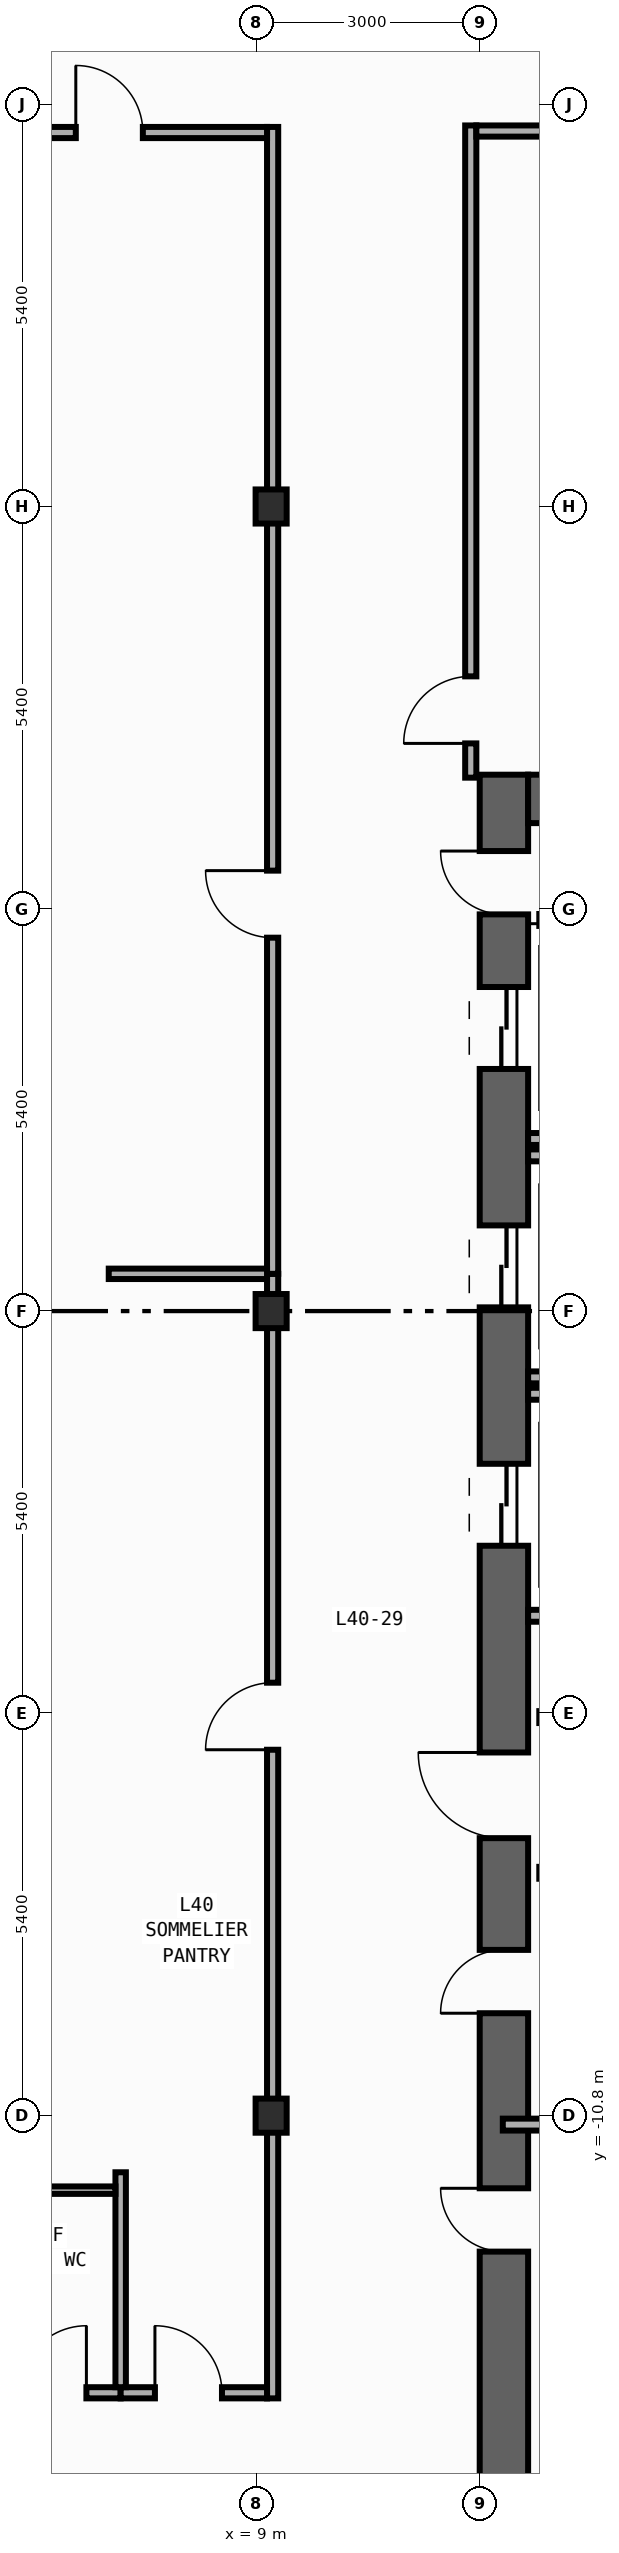
"""IFC4 building model, lengths in metres.
Left out: names, types, materials, properties, quantities, classifications, styles, units other than length and angle.
Written with IfcOpenShell. Run it as: python <this file> out.ifc"""

import sys

from ifc_helpers import new_model, si_unit, direction, frame, frame_2d, origin, origin_2d, place, context, subcontext, project, spatial, rectangle, i_section, extrude, element, fill, save


model = new_model("IFC4")
c1 = context("Model", 3, precision=1e-05, world=origin(), true_north=direction((0.0, 1.0)))
c2 = subcontext(c1, "Body", "Model", "MODEL_VIEW")
j1 = project(units=[si_unit("LENGTHUNIT", "METRE"), si_unit("PLANEANGLEUNIT", "RADIAN")], contexts=[c1])
p1 = place(None, origin())
s1 = spatial("IfcSite", under=j1, at=p1, CompositionType="ELEMENT")
p2 = place(p1, origin())
s2 = spatial("IfcBuilding", under=s1, at=p2, CompositionType="ELEMENT")
p3 = place(p2, frame((0.0, 0.0, 176.4)))
s3 = spatial("IfcBuildingStorey", under=s2, at=p3, CompositionType="ELEMENT", Elevation=176.4)
p4 = place(p3, frame((12.325, -19.8, 0.0), z_axis=(0.0, 0.0, 1.0), x_axis=(0.0, 1.0, 0.0)))
e1 = element("IfcWall", 1, at=p4, inside=s3, PredefinedType="SHEAR", context=c2, shape_type="SweptSolid", body=[
    extrude(rectangle(XDim=27.0, YDim=0.65, at=frame_2d((13.5, 0.0))), origin(), (0.0, 0.0, 1.0), 3.54),
])
p5 = place(p4, frame((23.05, 0.0, 0.0)))
e2 = element("IfcOpeningElement", 2, at=p5, cuts=e1, PredefinedType="OPENING", context=c2, shape_type="SweptSolid", body=[
    extrude(rectangle(XDim=1.1, YDim=2.2, at=frame_2d((0.55, 1.1))), frame((0.0, 0.335, 0.0), z_axis=(0.0, -1.0, 0.0), x_axis=(1.0, 0.0, 0.0)), (0.0, 0.0, 1.0), 0.67),
])
p6 = place(p4, frame((19.85, 0.0, 0.0)))
e3 = element("IfcOpeningElement", 3, at=p6, cuts=e1, PredefinedType="OPENING", context=c2, shape_type="SweptSolid", body=[
    extrude(rectangle(XDim=1.1, YDim=2.2, at=frame_2d((0.55, 1.1))), frame((0.0, 0.335, 0.0), z_axis=(0.0, -1.0, 0.0), x_axis=(1.0, 0.0, 0.0)), (0.0, 0.0, 1.0), 0.67),
])
p7 = place(p4, frame((16.65, 0.0, 0.0)))
e4 = element("IfcOpeningElement", 4, at=p7, cuts=e1, PredefinedType="OPENING", context=c2, shape_type="SweptSolid", body=[
    extrude(rectangle(XDim=1.1, YDim=2.2, at=frame_2d((0.55, 1.1))), frame((0.0, 0.335, 0.0), z_axis=(0.0, -1.0, 0.0), x_axis=(1.0, 0.0, 0.0)), (0.0, 0.0, 1.0), 0.67),
])
p8 = place(p4, frame((7.175, 0.0, 0.0)))
e5 = element("IfcOpeningElement", 5, at=p8, cuts=e1, PredefinedType="OPENING", context=c2, shape_type="SweptSolid", body=[
    extrude(rectangle(XDim=0.85, YDim=2.1, at=frame_2d((0.425, 1.05))), frame((0.0, 0.335, 0.0), z_axis=(0.0, -1.0, 0.0), x_axis=(1.0, 0.0, 0.0)), (0.0, 0.0, 1.0), 0.67),
])
p9 = place(p4, frame((10.375, 0.0, 0.0)))
e6 = element("IfcOpeningElement", 6, at=p9, cuts=e1, PredefinedType="OPENING", context=c2, shape_type="SweptSolid", body=[
    extrude(rectangle(XDim=0.85, YDim=2.1, at=frame_2d((0.425, 1.05))), frame((0.0, 0.335, 0.0), z_axis=(0.0, -1.0, 0.0), x_axis=(1.0, 0.0, 0.0)), (0.0, 0.0, 1.0), 0.67),
])
p10 = place(p4, frame((12.725, 0.0, 0.0)))
e7 = element("IfcOpeningElement", 7, at=p10, cuts=e1, PredefinedType="OPENING", context=c2, shape_type="SweptSolid", body=[
    extrude(rectangle(XDim=1.15, YDim=2.2, at=frame_2d((0.575, 1.1))), frame((0.0, 0.335, 0.0), z_axis=(0.0, -1.0, 0.0), x_axis=(1.0, 0.0, 0.0)), (0.0, 0.0, 1.0), 0.67),
])
p11 = place(p4, frame((25.125, 0.0, 0.0)))
e8 = element("IfcOpeningElement", 8, at=p11, cuts=e1, PredefinedType="OPENING", context=c2, shape_type="SweptSolid", body=[
    extrude(rectangle(XDim=0.85, YDim=2.1, at=frame_2d((0.425, 1.05))), frame((0.0, 0.335, 0.0), z_axis=(0.0, -1.0, 0.0), x_axis=(1.0, 0.0, 0.0)), (0.0, 0.0, 1.0), 0.67),
])
p12 = place(p3, frame((12.65, 6.875, 0.0), z_axis=(0.0, 0.0, 1.0), x_axis=(1.0, 0.0, 0.0)))
e9 = element("IfcWall", 9, at=p12, inside=s3, PredefinedType="SHEAR", context=c2, shape_type="SweptSolid", body=[
    extrude(rectangle(XDim=7.1, YDim=0.65, at=frame_2d((3.55, 0.0))), origin(), (0.0, 0.0, 1.0), 3.54),
])
for number, where, z_axis, x_axis in (
    (10, (9.2, -10.8, 0.0), (0.0, 0.0, 1.0), (1.0, 0.0, 0.0)),
    (11, (9.2, 0.0, 0.0), (0.0, 0.0, 1.0), (1.0, 0.0, 0.0)),
    (12, (9.2, 10.8, 0.0), (0.0, 0.0, 1.0), (1.0, 0.0, 0.0)),
):
    element("IfcColumn", number, at=place(p3, frame(where, z_axis=z_axis, x_axis=x_axis)), inside=s3, PredefinedType="COLUMN", context=c2, shape_type="SweptSolid", body=[
        extrude(i_section(OverallWidth=0.417, OverallDepth=0.458, WebThickness=0.03, FlangeThickness=0.05, FilletRadius=0.022, at=origin_2d()), origin(), (0.0, 0.0, 1.0), 3.8),
    ])
for number, where, z_axis, x_axis in (
    (13, (12.65, 2.31, 0.0), (0.0, 0.0, 1.0), (1.0, 0.0, 0.0)),
    (14, (12.65, -0.89, 0.0), (0.0, 0.0, 1.0), (1.0, 0.0, 0.0)),
    (15, (12.65, 2.09, 0.0), (0.0, 0.0, 1.0), (1.0, 0.0, 0.0)),
    (16, (12.65, -4.09, 0.0), (0.0, 0.0, 1.0), (1.0, 0.0, 0.0)),
    (17, (12.65, -1.11, 0.0), (0.0, 0.0, 1.0), (1.0, 0.0, 0.0)),
):
    element("IfcWall", number, at=place(p3, frame(where, z_axis=z_axis, x_axis=x_axis)), inside=s3, PredefinedType="STANDARD", context=c2, shape_type="SweptSolid", body=[
        extrude(rectangle(XDim=2.34, YDim=0.16, at=frame_2d((1.17, 0.0))), origin(), (0.0, 0.0, 1.0), 3.54),
    ])
for number, where, z_axis, x_axis in (
    (18, (12.8, -5.45, 0.0), (0.0, 0.0, 1.0), (1.0, 0.0, 0.0)),
    (19, (12.8, -7.54, 0.0), (0.0, 0.0, 1.0), (1.0, 0.0, 0.0)),
    (20, (12.8, 5.25, 0.0), (0.0, 0.0, 1.0), (1.0, 0.0, 0.0)),
):
    element("IfcWall", number, at=place(p3, frame(where, z_axis=z_axis, x_axis=x_axis)), inside=s3, PredefinedType="STANDARD", context=c2, shape_type="SweptSolid", body=[
        extrude(rectangle(XDim=2.6, YDim=0.16, at=frame_2d((1.3, 0.0))), origin(), (0.0, 0.0, 1.0), 3.54),
    ])
p13 = place(p3, frame((12.31, -10.92, 0.0), z_axis=(0.0, 0.0, 1.0), x_axis=(1.0, 0.0, 0.0)))
e21 = element("IfcWall", 21, at=p13, inside=s3, PredefinedType="PARTITIONING", context=c2, shape_type="SweptSolid", body=[
    extrude(rectangle(XDim=3.065, YDim=0.16, at=frame_2d((1.532, 0.0))), origin(), (0.0, 0.0, 1.0), 2.952),
])
p14 = place(p3, frame((9.22, -14.595, 0.0), z_axis=(0.0, 0.0, 1.0), x_axis=(0.0, 1.0, 0.0)))
e22 = element("IfcWall", 22, at=p14, inside=s3, PredefinedType="PARTITIONING", context=c2, shape_type="SweptSolid", body=[
    extrude(rectangle(XDim=15.095, YDim=0.15, at=frame_2d((7.547, 0.0))), origin(), (0.0, 0.0, 1.0), 2.952),
])
p15 = place(p14, frame((8.707, 0.0, 0.0)))
e23 = element("IfcOpeningElement", 23, at=p15, cuts=e22, PredefinedType="OPENING", context=c2, shape_type="SweptSolid", body=[
    extrude(rectangle(XDim=0.9, YDim=2.15, at=frame_2d((0.45, 1.075))), frame((0.0, 0.085, 0.0), z_axis=(0.0, -1.0, 0.0), x_axis=(1.0, 0.0, 0.0)), (0.0, 0.0, 1.0), 0.17),
])
p16 = place(p3, frame((9.22, 0.5, 0.0), z_axis=(0.0, 0.0, 1.0), x_axis=(0.0, 1.0, 0.0)))
e24 = element("IfcWall", 24, at=p16, inside=s3, PredefinedType="PARTITIONING", context=c2, shape_type="SweptSolid", body=[
    extrude(rectangle(XDim=15.395, YDim=0.15, at=frame_2d((7.698, 0.0))), origin(), (0.0, 0.0, 1.0), 2.952),
])
p17 = place(p16, frame((4.512, 0.0, 0.0)))
e25 = element("IfcOpeningElement", 25, at=p17, cuts=e24, PredefinedType="OPENING", context=c2, shape_type="SweptSolid", body=[
    extrude(rectangle(XDim=0.9, YDim=2.15, at=frame_2d((0.45, 1.075))), frame((0.0, 0.085, 0.0), z_axis=(0.0, -1.0, 0.0), x_axis=(1.0, 0.0, 0.0)), (0.0, 0.0, 1.0), 0.17),
])
p18 = place(p3, frame((11.88, 7.16, 0.0), z_axis=(0.0, 0.0, 1.0), x_axis=(0.0, 1.0, 0.0)))
e26 = element("IfcWall", 26, at=p18, inside=s3, PredefinedType="PARTITIONING", context=c2, shape_type="SweptSolid", body=[
    extrude(rectangle(XDim=8.755, YDim=0.15, at=frame_2d((4.377, 0.0))), origin(), (0.0, 0.0, 1.0), 3.54),
])
p19 = place(p18, frame((0.46, 0.0, 0.0)))
e27 = element("IfcOpeningElement", 27, at=p19, cuts=e26, PredefinedType="OPENING", context=c2, shape_type="SweptSolid", body=[
    extrude(rectangle(XDim=0.9, YDim=2.15, at=frame_2d((0.45, 1.075))), frame((0.0, 0.085, 0.0), z_axis=(0.0, -1.0, 0.0), x_axis=(1.0, 0.0, 0.0)), (0.0, 0.0, 1.0), 0.17),
])
p20 = place(p3, frame((-0.32, 15.82, 0.0), z_axis=(0.0, 0.0, 1.0), x_axis=(1.0, 0.0, 0.0)))
e28 = element("IfcWall", 28, at=p20, inside=s3, PredefinedType="PARTITIONING", context=c2, shape_type="SweptSolid", body=[
    extrude(rectangle(XDim=9.465, YDim=0.15, at=frame_2d((4.732, 0.0))), origin(), (0.0, 0.0, 1.0), 3.54),
])
p21 = place(p20, frame((6.898, 0.0, 0.0)))
e29 = element("IfcOpeningElement", 29, at=p21, cuts=e28, PredefinedType="OPENING", context=c2, shape_type="SweptSolid", body=[
    extrude(rectangle(XDim=0.9, YDim=2.15, at=frame_2d((0.45, 1.075))), frame((0.0, 0.085, 0.0), z_axis=(0.0, -1.0, 0.0), x_axis=(1.0, 0.0, 0.0)), (0.0, 0.0, 1.0), 0.17),
])
p22 = place(p3, frame((11.955, 15.84, 0.0), z_axis=(0.0, 0.0, 1.0), x_axis=(1.0, 0.0, 0.0)))
e30 = element("IfcWall", 30, at=p22, inside=s3, PredefinedType="PARTITIONING", context=c2, shape_type="SweptSolid", body=[
    extrude(rectangle(XDim=10.5, YDim=0.15, at=frame_2d((5.25, 0.0))), origin(), (0.0, 0.0, 1.0), 3.54),
])
p23 = place(p22, frame((4.901, 0.0, 0.0)))
e31 = element("IfcOpeningElement", 31, at=p23, cuts=e30, PredefinedType="OPENING", context=c2, shape_type="SweptSolid", body=[
    extrude(rectangle(XDim=0.9, YDim=2.15, at=frame_2d((0.45, 1.075))), frame((0.0, 0.085, 0.0), z_axis=(0.0, -1.0, 0.0), x_axis=(1.0, 0.0, 0.0)), (0.0, 0.0, 1.0), 0.17),
])
p24 = place(p3, frame((4.28, -14.52, 0.0), z_axis=(0.0, 0.0, 1.0), x_axis=(1.0, 0.0, 0.0)))
e32 = element("IfcWall", 32, at=p24, inside=s3, PredefinedType="PARTITIONING", context=c2, shape_type="SweptSolid", body=[
    extrude(rectangle(XDim=2.9, YDim=0.15, at=frame_2d((1.45, 0.0))), origin(), (0.0, 0.0, 1.0), 3.54),
])
p25 = place(p24, frame((1.54, 0.0, 0.0)))
e33 = element("IfcOpeningElement", 33, at=p25, cuts=e32, PredefinedType="OPENING", context=c2, shape_type="SweptSolid", body=[
    extrude(rectangle(XDim=0.9, YDim=2.15, at=frame_2d((0.45, 1.075))), frame((0.0, 0.085, 0.0), z_axis=(0.0, -1.0, 0.0), x_axis=(1.0, 0.0, 0.0)), (0.0, 0.0, 1.0), 0.17),
])
p26 = place(p3, frame((7.18, -14.52, 0.0), z_axis=(0.0, 0.0, 1.0), x_axis=(1.0, 0.0, 0.0)))
e34 = element("IfcWall", 34, at=p26, inside=s3, PredefinedType="PARTITIONING", context=c2, shape_type="SweptSolid", body=[
    extrude(rectangle(XDim=1.965, YDim=0.15, at=frame_2d((0.982, 0.0))), origin(), (0.0, 0.0, 1.0), 3.54),
])
p27 = place(p26, frame((0.46, 0.0, 0.0)))
e35 = element("IfcOpeningElement", 35, at=p27, cuts=e34, PredefinedType="OPENING", context=c2, shape_type="SweptSolid", body=[
    extrude(rectangle(XDim=0.9, YDim=2.15, at=frame_2d((0.45, 1.075))), frame((0.0, 0.085, 0.0), z_axis=(0.0, -1.0, 0.0), x_axis=(1.0, 0.0, 0.0)), (0.0, 0.0, 1.0), 0.17),
])
p28 = place(p3, frame((7.18, -14.445, 0.0), z_axis=(0.0, 0.0, 1.0), x_axis=(0.0, 1.0, 0.0)))
e36 = element("IfcWall", 36, at=p28, inside=s3, PredefinedType="PARTITIONING", context=c2, shape_type="SweptSolid", body=[
    extrude(rectangle(XDim=2.885, YDim=0.14, at=frame_2d((1.442, 0.0))), origin(), (0.0, 0.0, 1.0), 3.54),
])
p29 = place(p3, frame((7.02, 0.5, 0.0), z_axis=(0.0, 0.0, 1.0), x_axis=(1.0, 0.0, 0.0)))
e37 = element("IfcWall", 37, at=p29, inside=s3, PredefinedType="PARTITIONING", context=c2, shape_type="SweptSolid", body=[
    extrude(rectangle(XDim=2.125, YDim=0.14, at=frame_2d((1.062, 0.0))), origin(), (0.0, 0.0, 1.0), 3.54),
])
p30 = place(p3, frame((4.35, -11.8, 0.0), z_axis=(0.0, 0.0, 1.0), x_axis=(1.0, 0.0, 0.0)))
e38 = element("IfcWall", 38, at=p30, inside=s3, PredefinedType="PARTITIONING", context=c2, shape_type="SweptSolid", body=[
    extrude(rectangle(XDim=2.76, YDim=0.1, at=frame_2d((1.38, 0.0))), origin(), (0.0, 0.0, 1.0), 3.54),
])
p31 = place(p5, origin())
e39 = element("IfcDoor", 39, at=p31, inside=s3, OperationType="DOUBLE_DOOR_SLIDING", PredefinedType="DOOR", context=c2, shape_type="SweptSolid", body=[
    extrude(rectangle(XDim=1.1, YDim=2.2, at=frame_2d((0.55, 1.1))), frame((0.0, 0.025, 0.0), z_axis=(0.0, -1.0, 0.0), x_axis=(1.0, 0.0, 0.0)), (0.0, 0.0, 1.0), 0.05),
])
fill(e2, e39)
p32 = place(p6, origin())
e40 = element("IfcDoor", 40, at=p32, inside=s3, OperationType="DOUBLE_DOOR_SLIDING", PredefinedType="DOOR", context=c2, shape_type="SweptSolid", body=[
    extrude(rectangle(XDim=1.1, YDim=2.2, at=frame_2d((0.55, 1.1))), frame((0.0, 0.025, 0.0), z_axis=(0.0, -1.0, 0.0), x_axis=(1.0, 0.0, 0.0)), (0.0, 0.0, 1.0), 0.05),
])
fill(e3, e40)
p33 = place(p7, origin())
e41 = element("IfcDoor", 41, at=p33, inside=s3, OperationType="DOUBLE_DOOR_SLIDING", PredefinedType="DOOR", context=c2, shape_type="SweptSolid", body=[
    extrude(rectangle(XDim=1.1, YDim=2.2, at=frame_2d((0.55, 1.1))), frame((0.0, 0.025, 0.0), z_axis=(0.0, -1.0, 0.0), x_axis=(1.0, 0.0, 0.0)), (0.0, 0.0, 1.0), 0.05),
])
fill(e4, e41)
p34 = place(p8, origin())
e42 = element("IfcDoor", 42, at=p34, inside=s3, OperationType="SINGLE_SWING_RIGHT", PredefinedType="DOOR", context=c2, shape_type="SweptSolid", body=[
    extrude(rectangle(XDim=0.85, YDim=2.1, at=frame_2d((0.425, 1.05))), frame((0.0, 0.025, 0.0), z_axis=(0.0, -1.0, 0.0), x_axis=(1.0, 0.0, 0.0)), (0.0, 0.0, 1.0), 0.05),
])
fill(e5, e42)
p35 = place(p9, origin())
e43 = element("IfcDoor", 43, at=p35, inside=s3, OperationType="SINGLE_SWING_LEFT", PredefinedType="DOOR", context=c2, shape_type="SweptSolid", body=[
    extrude(rectangle(XDim=0.85, YDim=2.1, at=frame_2d((0.425, 1.05))), frame((0.0, 0.025, 0.0), z_axis=(0.0, -1.0, 0.0), x_axis=(1.0, 0.0, 0.0)), (0.0, 0.0, 1.0), 0.05),
])
fill(e6, e43)
p36 = place(p10, origin())
e44 = element("IfcDoor", 44, at=p36, inside=s3, OperationType="SINGLE_SWING_RIGHT", PredefinedType="DOOR", context=c2, shape_type="SweptSolid", body=[
    extrude(rectangle(XDim=1.15, YDim=2.2, at=frame_2d((0.575, 1.1))), frame((0.0, 0.025, 0.0), z_axis=(0.0, -1.0, 0.0), x_axis=(1.0, 0.0, 0.0)), (0.0, 0.0, 1.0), 0.05),
])
fill(e7, e44)
p37 = place(p11, origin())
e45 = element("IfcDoor", 45, at=p37, inside=s3, OperationType="SINGLE_SWING_RIGHT", PredefinedType="DOOR", context=c2, shape_type="SweptSolid", body=[
    extrude(rectangle(XDim=0.85, YDim=2.1, at=frame_2d((0.425, 1.05))), frame((0.0, 0.025, 0.0), z_axis=(0.0, -1.0, 0.0), x_axis=(1.0, 0.0, 0.0)), (0.0, 0.0, 1.0), 0.05),
])
fill(e8, e45)
p38 = place(p15, origin())
e46 = element("IfcDoor", 46, at=p38, inside=s3, OperationType="SINGLE_SWING_LEFT", PredefinedType="DOOR", context=c2, shape_type="SweptSolid", body=[
    extrude(rectangle(XDim=0.9, YDim=2.15, at=frame_2d((0.45, 1.075))), frame((0.0, 0.025, 0.0), z_axis=(0.0, -1.0, 0.0), x_axis=(1.0, 0.0, 0.0)), (0.0, 0.0, 1.0), 0.05),
])
fill(e23, e46)
p39 = place(p17, origin())
e47 = element("IfcDoor", 47, at=p39, inside=s3, OperationType="SINGLE_SWING_RIGHT", PredefinedType="DOOR", context=c2, shape_type="SweptSolid", body=[
    extrude(rectangle(XDim=0.9, YDim=2.15, at=frame_2d((0.45, 1.075))), frame((0.0, 0.025, 0.0), z_axis=(0.0, -1.0, 0.0), x_axis=(1.0, 0.0, 0.0)), (0.0, 0.0, 1.0), 0.05),
])
fill(e25, e47)
p40 = place(p19, origin())
e48 = element("IfcDoor", 48, at=p40, inside=s3, OperationType="SINGLE_SWING_LEFT", PredefinedType="DOOR", context=c2, shape_type="SweptSolid", body=[
    extrude(rectangle(XDim=0.9, YDim=2.15, at=frame_2d((0.45, 1.075))), frame((0.0, 0.025, 0.0), z_axis=(0.0, -1.0, 0.0), x_axis=(1.0, 0.0, 0.0)), (0.0, 0.0, 1.0), 0.05),
])
fill(e27, e48)
p41 = place(p21, origin())
e49 = element("IfcDoor", 49, at=p41, inside=s3, OperationType="SINGLE_SWING_LEFT", PredefinedType="DOOR", context=c2, shape_type="SweptSolid", body=[
    extrude(rectangle(XDim=0.9, YDim=2.15, at=frame_2d((0.45, 1.075))), frame((0.0, 0.025, 0.0), z_axis=(0.0, -1.0, 0.0), x_axis=(1.0, 0.0, 0.0)), (0.0, 0.0, 1.0), 0.05),
])
fill(e29, e49)
p42 = place(p25, origin())
e50 = element("IfcDoor", 50, at=p42, inside=s3, OperationType="SINGLE_SWING_RIGHT", PredefinedType="DOOR", context=c2, shape_type="SweptSolid", body=[
    extrude(rectangle(XDim=0.9, YDim=2.15, at=frame_2d((0.45, 1.075))), frame((0.0, 0.025, 0.0), z_axis=(0.0, -1.0, 0.0), x_axis=(1.0, 0.0, 0.0)), (0.0, 0.0, 1.0), 0.05),
])
fill(e33, e50)
p43 = place(p27, origin())
e51 = element("IfcDoor", 51, at=p43, inside=s3, OperationType="SINGLE_SWING_LEFT", PredefinedType="DOOR", context=c2, shape_type="SweptSolid", body=[
    extrude(rectangle(XDim=0.9, YDim=2.15, at=frame_2d((0.45, 1.075))), frame((0.0, 0.025, 0.0), z_axis=(0.0, -1.0, 0.0), x_axis=(1.0, 0.0, 0.0)), (0.0, 0.0, 1.0), 0.05),
])
fill(e35, e51)
save(model, sys.argv[1])
